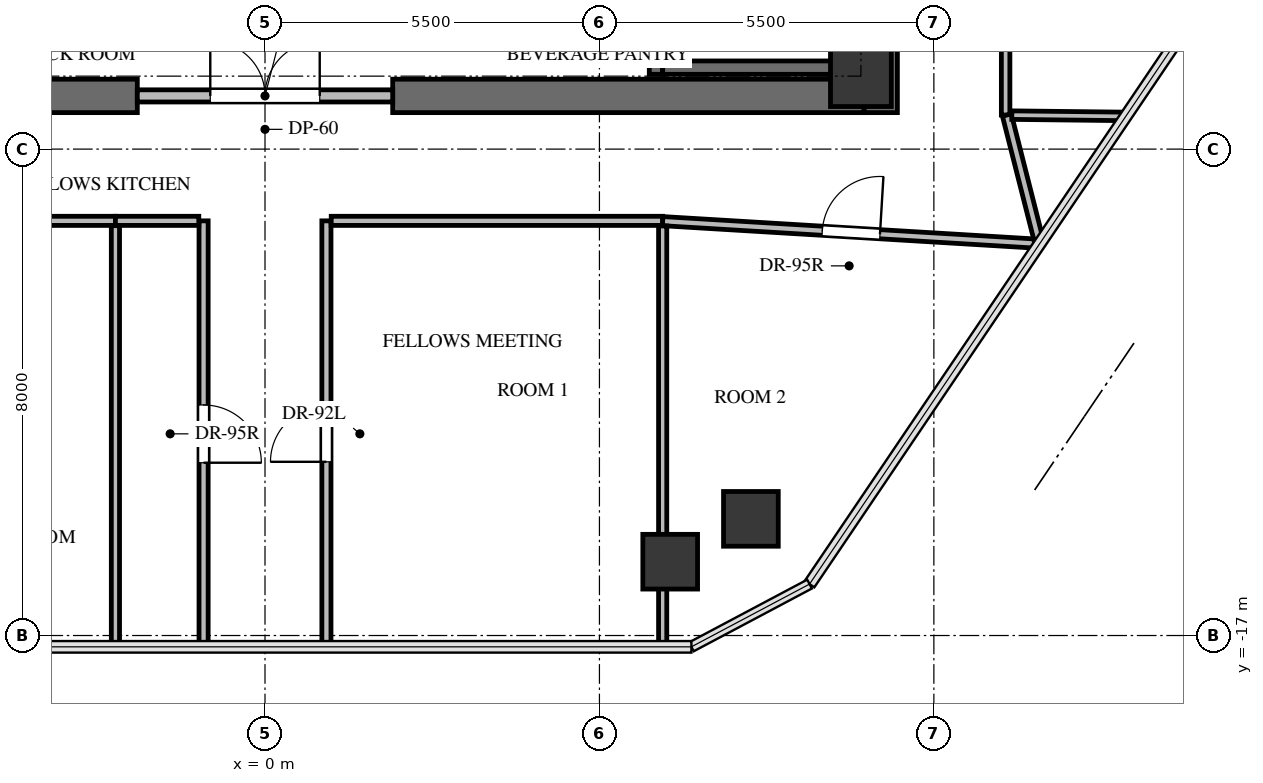
"""IFC4 building model, lengths in metres.
Left out: names, types, materials, properties, quantities, classifications, styles, units other than length and angle.
Written with IfcOpenShell. Run it as: python <this file> out.ifc"""

import sys

from ifc_helpers import new_model, si_unit, direction, frame, frame_2d, origin, origin_2d, place, context, subcontext, project, spatial, rectangle, extrude, source, transform, mapped, element, fill, save


model = new_model("IFC4")
c1 = context("Model", 3, precision=1e-05, world=origin(), true_north=direction((0.0, 1.0)))
c2 = subcontext(c1, "Body", "Model", "MODEL_VIEW")
j1 = project(units=[si_unit("LENGTHUNIT", "METRE"), si_unit("PLANEANGLEUNIT", "RADIAN")], contexts=[c1])
p1 = place(None, origin())
s1 = spatial("IfcSite", under=j1, at=p1, CompositionType="ELEMENT")
p2 = place(p1, origin())
s2 = spatial("IfcBuilding", under=s1, at=p2, CompositionType="ELEMENT")
p3 = place(p2, frame((0.0, 0.0, 254.7)))
s3 = spatial("IfcBuildingStorey", under=s2, at=p3, CompositionType="ELEMENT", Elevation=254.7)
p4 = place(p3, frame((10.125, -8.4, 0.0), z_axis=(0.0, 0.0, 1.0), x_axis=(0.0, 1.0, 0.0)))
e1 = element("IfcWall", 1, at=p4, inside=s3, PredefinedType="SHEAR", context=c2, shape_type="SweptSolid", body=[
    extrude(rectangle(XDim=16.8, YDim=0.55, at=frame_2d((8.4, 0.0))), origin(), (0.0, 0.0, 1.0), 3.4),
])
for number, where, z_axis, x_axis in (
    (2, (-9.85, -8.125, 0.0), (0.0, 0.0, 1.0), (1.0, 0.0, 0.0)),
    (3, (2.1, -8.125, 0.0), (0.0, 0.0, 1.0), (1.0, 0.0, 0.0)),
):
    element("IfcWall", number, at=place(p3, frame(where, z_axis=z_axis, x_axis=x_axis)), inside=s3, PredefinedType="SHEAR", context=c2, shape_type="SweptSolid", body=[
        extrude(rectangle(XDim=7.75, YDim=0.55, at=frame_2d((3.875, 0.0))), origin(), (0.0, 0.0, 1.0), 3.4),
    ])
p5 = place(p3, frame((9.61, -7.77, -0.24), z_axis=(0.0, 0.0, 1.0), x_axis=(0.0, 1.0, 0.0)))
e4 = element("IfcWall", 4, at=p5, inside=s3, PredefinedType="SHEAR", context=c2, shape_type="SweptSolid", body=[
    extrude(rectangle(XDim=7.89, YDim=0.22, at=frame_2d((3.945, 0.0))), origin(), (0.0, 0.0, 1.0), 3.4),
])
p6 = place(p3, frame((6.43, 0.12, -0.24), z_axis=(0.0, 0.0, 1.0), x_axis=(0.0, -1.0, 0.0)))
e5 = element("IfcWall", 5, at=p6, inside=s3, PredefinedType="SHEAR", context=c2, shape_type="SweptSolid", body=[
    extrude(rectangle(XDim=7.89, YDim=0.22, at=frame_2d((3.945, 0.0))), origin(), (0.0, 0.0, 1.0), 3.4),
])
p7 = place(p6, frame((0.52, 0.0, 0.0)))
e6 = element("IfcOpeningElement", 6, at=p7, cuts=e5, PredefinedType="OPENING", context=c2, shape_type="SweptSolid", body=[
    extrude(rectangle(XDim=1.05, YDim=2.15, at=frame_2d((0.525, 1.075))), frame((0.0, 0.12, 0.0), z_axis=(0.0, -1.0, 0.0), x_axis=(1.0, 0.0, 0.0)), (0.0, 0.0, 1.0), 0.24),
])
p8 = place(p3, frame((6.54, -7.66, -0.24), z_axis=(0.0, 0.0, 1.0), x_axis=(1.0, 0.0, 0.0)))
e7 = element("IfcWall", 7, at=p8, inside=s3, PredefinedType="SHEAR", context=c2, shape_type="SweptSolid", body=[
    extrude(rectangle(XDim=2.96, YDim=0.22, at=frame_2d((1.48, 0.0))), origin(), (0.0, 0.0, 1.0), 3.4),
])
m1 = source(origin(), c2, "Body", "SweptSolid", [
    extrude(rectangle(XDim=1.0, YDim=1.0, at=origin_2d()), origin(), (0.0, 0.0, 1.0), 3.4),
])
p9 = place(p3, frame((9.8, -7.8, -0.24), z_axis=(0.0, 0.0, 1.0), x_axis=(1.0, 0.0, 0.0)))
e8 = element("IfcColumn", 8, at=p9, inside=s3, PredefinedType="COLUMN", context=c2, shape_type="MappedRepresentation", body=[
    mapped(m1, transform((0.0, 0.0, 0.0), x_axis=(1.0, 0.0, 0.0), y_axis=(0.0, 1.0, 0.0), z_axis=(0.0, 0.0, 1.0), scale=1.0)),
])
m2 = source(origin(), c2, "Body", "SweptSolid", [
    extrude(rectangle(XDim=0.9, YDim=0.9, at=origin_2d()), origin(), (0.0, 0.0, 1.0), 3.4),
])
for number, where, z_axis, x_axis in (
    (9, (7.991, -15.081, -0.24), (0.0, 0.0, 1.0), (1.0, 0.0, 0.0)),
    (10, (6.664, -15.786, -0.24), (0.0, 0.0, 1.0), (1.0, 0.0, 0.0)),
):
    element("IfcColumn", number, at=place(p3, frame(where, z_axis=z_axis, x_axis=x_axis)), inside=s3, PredefinedType="COLUMN", context=c2, shape_type="MappedRepresentation", body=[
        mapped(m2, transform((0.0, 0.0, 0.0), x_axis=(1.0, 0.0, 0.0), y_axis=(0.0, 1.0, 0.0), z_axis=(0.0, 0.0, 1.0), scale=1.0)),
    ])
p10 = place(p3, frame((-2.1, -8.125, 0.0), z_axis=(0.0, 0.0, 1.0), x_axis=(1.0, 0.0, 0.0)))
e11 = element("IfcWall", 11, at=p10, inside=s3, PredefinedType="SOLIDWALL", context=c2, shape_type="SweptSolid", body=[
    extrude(rectangle(XDim=4.2, YDim=0.2, at=frame_2d((2.1, 0.0))), origin(), (0.0, 0.0, 1.0), 3.145),
])
p11 = place(p10, frame((1.2, 0.0, 0.0)))
e12 = element("IfcOpeningElement", 12, at=p11, cuts=e11, PredefinedType="OPENING", context=c2, shape_type="SweptSolid", body=[
    extrude(rectangle(XDim=1.8, YDim=2.15, at=frame_2d((0.9, 1.075))), frame((0.0, 0.11, 0.0), z_axis=(0.0, -1.0, 0.0), x_axis=(1.0, 0.0, 0.0)), (0.0, 0.0, 1.0), 0.22),
])
p12 = place(p3, frame((12.18, -8.44, 0.0), z_axis=(0.0, 0.0, 1.0), x_axis=(0.0, 1.0, 0.0)))
e13 = element("IfcWall", 13, at=p12, inside=s3, PredefinedType="PARTITIONING", context=c2, shape_type="SweptSolid", body=[
    extrude(rectangle(XDim=3.48, YDim=0.14, at=frame_2d((1.74, 0.0))), origin(), (0.0, 0.0, 1.0), 2.499),
])
p13 = place(p12, frame((1.29, 0.0, 0.0)))
e14 = element("IfcOpeningElement", 14, at=p13, cuts=e13, PredefinedType="OPENING", context=c2, shape_type="SweptSolid", body=[
    extrude(rectangle(XDim=0.9, YDim=2.05, at=frame_2d((0.45, 1.025))), frame((0.0, 0.08, 0.0), z_axis=(0.0, -1.0, 0.0), x_axis=(1.0, 0.0, 0.0)), (0.0, 0.0, 1.0), 0.16),
])
p14 = place(p3, frame((-7.96, -10.18, 0.0), z_axis=(0.0, 0.0, 1.0), x_axis=(1.0, 0.0, 0.0)))
e15 = element("IfcWall", 15, at=p14, inside=s3, PredefinedType="PARTITIONING", context=c2, shape_type="SweptSolid", body=[
    extrude(rectangle(XDim=5.5, YDim=0.15, at=frame_2d((2.75, 0.0))), origin(), (0.0, 0.0, 1.0), 2.401),
])
p15 = place(p14, frame((2.29, 0.0, 0.0)))
e16 = element("IfcOpeningElement", 16, at=p15, cuts=e15, PredefinedType="OPENING", context=c2, shape_type="SweptSolid", body=[
    extrude(rectangle(XDim=0.92, YDim=2.1, at=frame_2d((0.46, 1.05))), frame((0.0, 0.085, 0.0), z_axis=(0.0, -1.0, 0.0), x_axis=(1.0, 0.0, 0.0)), (0.0, 0.0, 1.0), 0.17),
])
p16 = place(p3, frame((-1.01, -10.18, 0.0), z_axis=(0.0, 0.0, 1.0), x_axis=(0.0, -1.0, 0.0)))
e17 = element("IfcWall", 17, at=p16, inside=s3, PredefinedType="PARTITIONING", context=c2, shape_type="SweptSolid", body=[
    extrude(rectangle(XDim=7.006, YDim=0.15, at=frame_2d((3.503, 0.0))), origin(), (0.0, 0.0, 1.0), 2.499),
])
p17 = place(p16, frame((3.028, 0.0, 0.0)))
e18 = element("IfcOpeningElement", 18, at=p17, cuts=e17, PredefinedType="OPENING", context=c2, shape_type="SweptSolid", body=[
    extrude(rectangle(XDim=0.95, YDim=2.1, at=frame_2d((0.475, 1.05))), frame((0.0, 0.085, 0.0), z_axis=(0.0, -1.0, 0.0), x_axis=(1.0, 0.0, 0.0)), (0.0, 0.0, 1.0), 0.17),
])
p18 = place(p3, frame((-2.46, -10.18, 0.0), z_axis=(0.0, 0.0, 1.0), x_axis=(1.0, 0.0, 0.0)))
e19 = element("IfcWall", 19, at=p18, inside=s3, PredefinedType="PARTITIONING", context=c2, shape_type="SweptSolid", body=[
    extrude(rectangle(XDim=1.371, YDim=0.15, at=frame_2d((0.686, 0.0))), origin(), (0.0, 0.0, 1.0), 3.145),
])
p19 = place(p3, frame((1.01, -17.186, 0.0), z_axis=(0.0, 0.0, 1.0), x_axis=(0.0, 1.0, 0.0)))
e20 = element("IfcWall", 20, at=p19, inside=s3, PredefinedType="PARTITIONING", context=c2, shape_type="SweptSolid", body=[
    extrude(rectangle(XDim=7.006, YDim=0.15, at=frame_2d((3.503, 0.0))), origin(), (0.0, 0.0, 1.0), 2.499),
])
p20 = place(p19, frame((3.043, 0.0, 0.0)))
e21 = element("IfcOpeningElement", 21, at=p20, cuts=e20, PredefinedType="OPENING", context=c2, shape_type="SweptSolid", body=[
    extrude(rectangle(XDim=0.92, YDim=2.1, at=frame_2d((0.46, 1.05))), frame((0.0, 0.085, 0.0), z_axis=(0.0, -1.0, 0.0), x_axis=(1.0, 0.0, 0.0)), (0.0, 0.0, 1.0), 0.17),
])
p21 = place(p3, frame((1.089, -10.18, 0.0), z_axis=(0.0, 0.0, 1.0), x_axis=(1.0, 0.0, 0.0)))
e22 = element("IfcWall", 22, at=p21, inside=s3, PredefinedType="PARTITIONING", context=c2, shape_type="SweptSolid", body=[
    extrude(rectangle(XDim=5.451, YDim=0.15, at=frame_2d((2.726, 0.0))), origin(), (0.0, 0.0, 1.0), 2.401),
])
p22 = place(p3, frame((6.54, -10.185, 0.0), z_axis=(0.0, 0.0, 1.0), x_axis=(0.9981941592, -0.060070130174, 0.0)))
e23 = element("IfcWall", 23, at=p22, inside=s3, PredefinedType="PARTITIONING", context=c2, shape_type="SweptSolid", body=[
    extrude(rectangle(XDim=6.21, YDim=0.15, at=frame_2d((3.105, 0.0))), origin(), (0.0, 0.0, 1.0), 2.499),
])
p23 = place(p22, frame((2.63, 0.0, 0.0)))
e24 = element("IfcOpeningElement", 24, at=p23, cuts=e23, PredefinedType="OPENING", context=c2, shape_type="SweptSolid", body=[
    extrude(rectangle(XDim=0.95, YDim=2.1, at=frame_2d((0.475, 1.05))), frame((0.0, 0.085, 0.0), z_axis=(0.0, -1.0, 0.0), x_axis=(1.0, 0.0, 0.0)), (0.0, 0.0, 1.0), 0.17),
])
p24 = place(p3, frame((12.719, -10.477, 0.0), z_axis=(0.0, 0.0, 1.0), x_axis=(-0.246550381988, 0.96912997536, 0.0)))
e25 = element("IfcWall", 25, at=p24, inside=s3, PredefinedType="PARTITIONING", context=c2, shape_type="SweptSolid", body=[
    extrude(rectangle(XDim=2.102, YDim=0.15, at=frame_2d((1.051, 0.0))), origin(), (0.0, 0.0, 1.0), 2.499),
])
p25 = place(p3, frame((14.156, -8.462, 0.0), z_axis=(0.0, 0.0, 1.0), x_axis=(-0.999935742613, 0.011336253532, 0.0)))
e26 = element("IfcWall", 26, at=p25, inside=s3, PredefinedType="PARTITIONING", context=c2, shape_type="SweptSolid", body=[
    extrude(rectangle(XDim=1.874, YDim=0.14, at=frame_2d((0.937, 0.0))), origin(), (0.0, 0.0, 1.0), 2.499),
])
p26 = place(p3, frame((-2.46, -10.259, 0.0), z_axis=(0.0, 0.0, 1.0), x_axis=(0.0, -1.0, 0.0)))
e27 = element("IfcWall", 27, at=p26, inside=s3, PredefinedType="PARTITIONING", context=c2, shape_type="SweptSolid", body=[
    extrude(rectangle(XDim=6.927, YDim=0.135, at=frame_2d((3.463, 0.0))), origin(), (0.0, 0.0, 1.0), 2.499),
])
p27 = place(p3, frame((6.54, -10.264, 0.0), z_axis=(0.0, 0.0, 1.0), x_axis=(0.0, -1.0, 0.0)))
e28 = element("IfcWall", 28, at=p27, inside=s3, PredefinedType="PARTITIONING", context=c2, shape_type="SweptSolid", body=[
    extrude(rectangle(XDim=5.606, YDim=0.135, at=frame_2d((2.803, 0.0))), origin(), (0.0, 0.0, 1.0), 2.401),
])
p28 = place(p3, frame((6.54, -15.87, 0.0), z_axis=(0.0, 0.0, 1.0), x_axis=(0.0, -1.0, 0.0)))
e29 = element("IfcWall", 29, at=p28, inside=s3, PredefinedType="PARTITIONING", context=c2, shape_type="SweptSolid", body=[
    extrude(rectangle(XDim=1.316, YDim=0.135, at=frame_2d((0.658, 0.0))), origin(), (0.0, 0.0, 1.0), 1.977),
])
m3 = source(origin(), c2, "Body", "SweptSolid", [
    extrude(rectangle(XDim=1.8, YDim=2.15, at=frame_2d((0.9, 1.075))), frame((0.0, 0.025, 0.0), z_axis=(0.0, -1.0, 0.0), x_axis=(1.0, 0.0, 0.0)), (0.0, 0.0, 1.0), 0.05),
])
p29 = place(p11, origin())
e30 = element("IfcDoor", 30, at=p29, inside=s3, OperationType="DOUBLE_DOOR_SINGLE_SWING", PredefinedType="DOOR", context=c2, shape_type="MappedRepresentation", body=[
    mapped(m3, transform((0.0, 0.0, 0.0), x_axis=(1.0, 0.0, 0.0), y_axis=(0.0, 1.0, 0.0), z_axis=(0.0, 0.0, 1.0), scale=1.0)),
])
fill(e12, e30)
m4 = source(origin(), c2, "Body", "SweptSolid", [
    extrude(rectangle(XDim=0.95, YDim=2.1, at=frame_2d((0.475, 1.05))), frame((0.0, 0.025, 0.0), z_axis=(0.0, -1.0, 0.0), x_axis=(1.0, 0.0, 0.0)), (0.0, 0.0, 1.0), 0.05),
])
p30 = place(p17, origin())
e31 = element("IfcDoor", 31, at=p30, inside=s3, OperationType="SINGLE_SWING_RIGHT", PredefinedType="DOOR", context=c2, shape_type="MappedRepresentation", body=[
    mapped(m4, transform((0.0, 0.0, 0.0), x_axis=(1.0, 0.0, 0.0), y_axis=(0.0, 1.0, 0.0), z_axis=(0.0, 0.0, 1.0), scale=1.0)),
])
fill(e18, e31)
m5 = source(origin(), c2, "Body", "SweptSolid", [
    extrude(rectangle(XDim=0.92, YDim=2.1, at=frame_2d((0.46, 1.05))), frame((0.0, 0.025, 0.0), z_axis=(0.0, -1.0, 0.0), x_axis=(1.0, 0.0, 0.0)), (0.0, 0.0, 1.0), 0.05),
])
p31 = place(p20, origin())
e32 = element("IfcDoor", 32, at=p31, inside=s3, OperationType="SINGLE_SWING_LEFT", PredefinedType="DOOR", context=c2, shape_type="MappedRepresentation", body=[
    mapped(m5, transform((0.0, 0.0, 0.0), x_axis=(1.0, 0.0, 0.0), y_axis=(0.0, 1.0, 0.0), z_axis=(0.0, 0.0, 1.0), scale=1.0)),
])
fill(e21, e32)
p32 = place(p23, origin())
e33 = element("IfcDoor", 33, at=p32, inside=s3, OperationType="SINGLE_SWING_RIGHT", PredefinedType="DOOR", context=c2, shape_type="MappedRepresentation", body=[
    mapped(m4, transform((0.0, 0.0, 0.0), x_axis=(1.0, 0.0, 0.0), y_axis=(0.0, 1.0, 0.0), z_axis=(0.0, 0.0, 1.0), scale=1.0)),
])
fill(e24, e33)
save(model, sys.argv[1])
